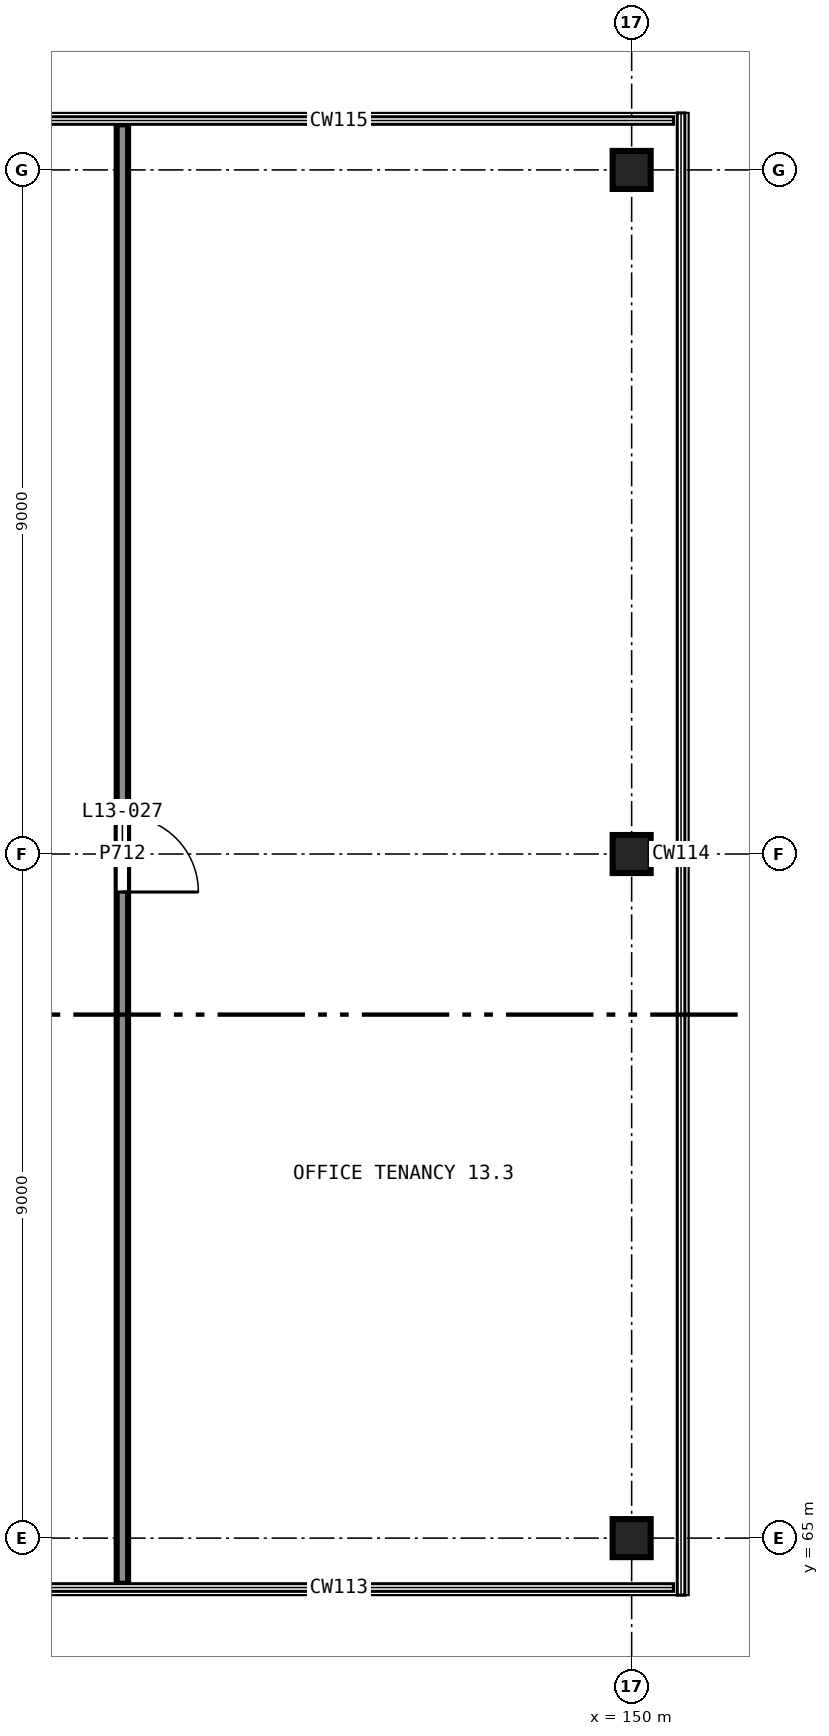
"""IFC4 building model, lengths in metres.
Left out: names, types, materials, properties, quantities, classifications, styles, units other than length and angle.
Written with IfcOpenShell. Run it as: python <this file> out.ifc"""

import sys

from ifc_helpers import new_model, si_unit, direction, frame, frame_2d, origin, origin_2d, place, context, subcontext, project, spatial, rectangle, extrude, element, fill, save


model = new_model("IFC4")
c1 = context("Model", 3, precision=1e-05, world=origin(), true_north=direction((0.0, 1.0)))
c2 = subcontext(c1, "Body", "Model", "MODEL_VIEW")
j1 = project(units=[si_unit("LENGTHUNIT", "METRE"), si_unit("PLANEANGLEUNIT", "RADIAN")], contexts=[c1])
p1 = place(None, origin())
s1 = spatial("IfcSite", under=j1, at=p1, CompositionType="ELEMENT")
p2 = place(p1, origin())
s2 = spatial("IfcBuilding", under=s1, at=p2, CompositionType="ELEMENT")
p3 = place(p2, frame((0.0, 0.0, 53.5)))
s3 = spatial("IfcBuildingStorey", under=s2, at=p3, CompositionType="ELEMENT", Elevation=53.5)
for number, where, z_axis, x_axis in (
    (1, (150.0, 65.0, 0.0), (0.0, 0.0, 1.0), (1.0, 0.0, 0.0)),
    (2, (150.0, 74.0, 0.0), (0.0, 0.0, 1.0), (1.0, 0.0, 0.0)),
    (3, (150.0, 83.0, 0.0), (0.0, 0.0, 1.0), (1.0, 0.0, 0.0)),
):
    element("IfcColumn", number, at=place(p3, frame(where, z_axis=z_axis, x_axis=x_axis)), inside=s3, PredefinedType="COLUMN", context=c2, shape_type="SweptSolid", body=[
        extrude(rectangle(XDim=0.5, YDim=0.5, at=origin_2d()), origin(), (0.0, 0.0, 1.0), 4.0),
    ])
p4 = place(p3, frame((143.3, 83.6, 0.0), z_axis=(0.0, 0.0, 1.0), x_axis=(0.0, -1.0, 0.0)))
e4 = element("IfcWall", 4, at=p4, inside=s3, PredefinedType="PARTITIONING", context=c2, shape_type="SweptSolid", body=[
    extrude(rectangle(XDim=19.2, YDim=0.15, at=frame_2d((9.6, 0.0))), origin(), (0.0, 0.0, 1.0), 3.75),
])
p5 = place(p4, frame((9.1, 0.0, 0.0)))
e5 = element("IfcOpeningElement", 5, at=p5, cuts=e4, PredefinedType="OPENING", context=c2, shape_type="SweptSolid", body=[
    extrude(rectangle(XDim=1.0, YDim=2.1, at=frame_2d((0.5, 1.05))), frame((0.0, 0.085, 0.0), z_axis=(0.0, -1.0, 0.0), x_axis=(1.0, 0.0, 0.0)), (0.0, 0.0, 1.0), 0.17),
])
p6 = place(p5, origin())
e6 = element("IfcDoor", 6, at=p6, inside=s3, OperationType="SINGLE_SWING_LEFT", PredefinedType="DOOR", context=c2, shape_type="SweptSolid", body=[
    extrude(rectangle(XDim=1.0, YDim=2.1, at=frame_2d((0.5, 1.05))), frame((0.0, 0.025, 0.0), z_axis=(0.0, -1.0, 0.0), x_axis=(1.0, 0.0, 0.0)), (0.0, 0.0, 1.0), 0.05),
])
fill(e5, e6)
save(model, sys.argv[1])
